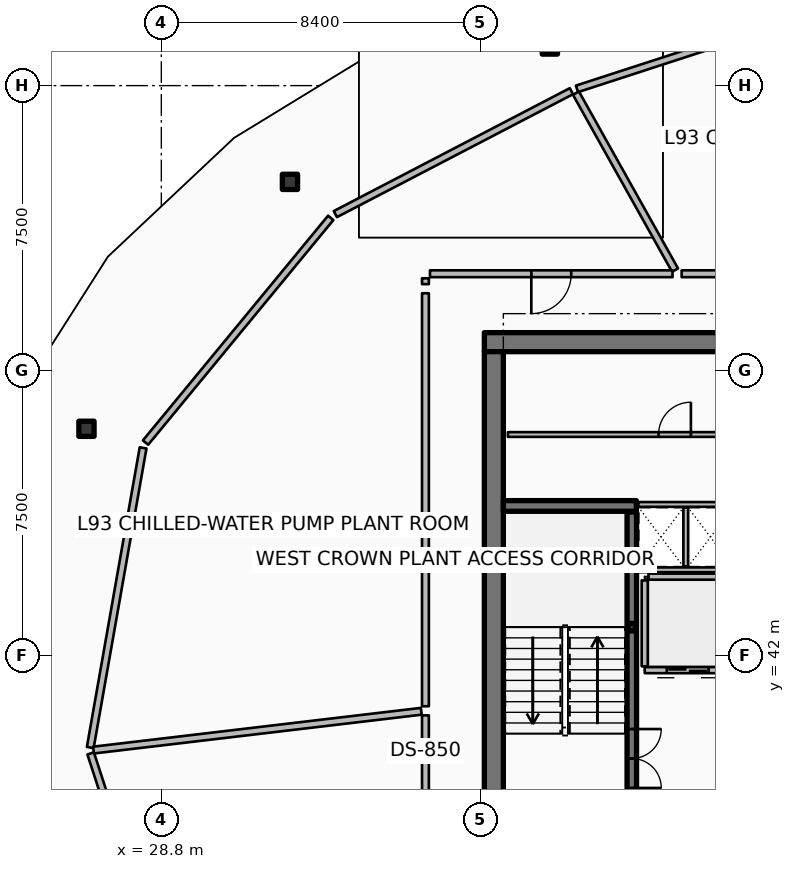
"""IFC4 building model, lengths in metres.
Left out: names, types, materials, properties, quantities, classifications, styles, units other than length and angle.
Written with IfcOpenShell. Run it as: python <this file> out.ifc"""

import sys

from ifc_helpers import new_model, si_unit, direction, frame, frame_2d, origin, origin_2d, place, context, subcontext, project, spatial, rectangle, hollow_rectangle, extrude, element, fill, save


model = new_model("IFC4")
c1 = context("Model", 3, precision=1e-05, world=origin(), true_north=direction((0.0, 1.0)))
c2 = subcontext(c1, "Body", "Model", "MODEL_VIEW")
j1 = project(units=[si_unit("LENGTHUNIT", "METRE"), si_unit("PLANEANGLEUNIT", "RADIAN")], contexts=[c1])
p1 = place(None, origin())
s1 = spatial("IfcSite", under=j1, at=p1, CompositionType="ELEMENT")
p2 = place(p1, origin())
s2 = spatial("IfcBuilding", under=s1, at=p2, CompositionType="ELEMENT")
p3 = place(p2, frame((0.0, 0.0, 370.4)))
s3 = spatial("IfcBuildingStorey", under=s2, at=p3, CompositionType="ELEMENT", Elevation=370.4)
p4 = place(p3, frame((37.3, 50.25, 0.0), z_axis=(0.0, 0.0, 1.0), x_axis=(1.0, 0.0, 0.0)))
e1 = element("IfcWall", 1, at=p4, inside=s3, PredefinedType="SHEAR", context=c2, shape_type="SweptSolid", body=[
    extrude(rectangle(XDim=9.6, YDim=0.5, at=frame_2d((4.8, 0.0))), origin(), (0.0, 0.0, 1.0), 3.6),
])
p5 = place(p3, frame((37.55, 34.0, 0.0), z_axis=(0.0, 0.0, 1.0), x_axis=(0.0, 1.0, 0.0)))
e2 = element("IfcWall", 2, at=p5, inside=s3, PredefinedType="SHEAR", context=c2, shape_type="SweptSolid", body=[
    extrude(rectangle(XDim=16.0, YDim=0.5, at=frame_2d((8.0, 0.0))), origin(), (0.0, 0.0, 1.0), 3.6),
])
p6 = place(p3, frame((37.8, 45.94, 0.0), z_axis=(0.0, 0.0, 1.0), x_axis=(1.0, 0.0, 0.0)))
e3 = element("IfcWall", 3, at=p6, inside=s3, PredefinedType="SHEAR", context=c2, shape_type="SweptSolid", body=[
    extrude(rectangle(XDim=3.5, YDim=0.28, at=frame_2d((1.75, 0.0))), origin(), (0.0, 0.0, 1.0), 3.6),
])
p7 = place(p3, frame((41.18, 42.75, 0.0), z_axis=(0.0, 0.0, 1.0), x_axis=(1.0, 0.0, 0.0)))
e4 = element("IfcColumn", 4, at=p7, inside=s3, PredefinedType="COLUMN", context=c2, shape_type="SweptSolid", body=[
    extrude(hollow_rectangle(XDim=0.2, YDim=0.2, WallThickness=0.01, InnerFilletRadius=0.01, OuterFilletRadius=0.02, at=origin_2d()), origin(), (0.0, 0.0, 1.0), 1.595),
])
for number, where, z_axis, x_axis in (
    (5, (39.023, 58.029, 0.0), (0.0, 0.0, 1.0), (1.0, 0.0, 0.0)),
    (6, (32.185, 54.468, 0.0), (0.0, 0.0, 1.0), (1.0, 0.0, 0.0)),
    (7, (26.83, 47.97, 0.0), (0.0, 0.0, 1.0), (1.0, 0.0, 0.0)),
):
    element("IfcColumn", number, at=place(p3, frame(where, z_axis=z_axis, x_axis=x_axis)), inside=s3, PredefinedType="COLUMN", context=c2, shape_type="SweptSolid", body=[
        extrude(hollow_rectangle(XDim=0.4, YDim=0.4, WallThickness=0.02, InnerFilletRadius=0.02, OuterFilletRadius=0.04, at=origin_2d()), origin(), (0.0, 0.0, 1.0), 3.32),
    ])
p8 = place(p3, frame((41.18, 38.22, 0.0), z_axis=(0.0, 0.0, 1.0), x_axis=(0.0, 1.0, 0.0)))
e8 = element("IfcWall", 8, at=p8, inside=s3, PredefinedType="SOLIDWALL", context=c2, shape_type="SweptSolid", body=[
    extrude(rectangle(XDim=7.56, YDim=0.25, at=frame_2d((3.78, 0.0))), origin(), (0.0, 0.0, 1.0), 3.32),
])
p9 = place(p8, frame((0.3, 0.0, 0.0)))
e9 = element("IfcOpeningElement", 9, at=p9, cuts=e8, PredefinedType="OPENING", context=c2, shape_type="SweptSolid", body=[
    extrude(rectangle(XDim=1.55, YDim=2.15, at=frame_2d((0.775, 1.075))), frame((0.0, 0.135, 0.0), z_axis=(0.0, -1.0, 0.0), x_axis=(1.0, 0.0, 0.0)), (0.0, 0.0, 1.0), 0.27),
])
p10 = place(p3, frame((43.78, 41.62, 0.0), z_axis=(0.0, 0.0, 1.0), x_axis=(-1.0, 0.0, 0.0)))
e10 = element("IfcWall", 10, at=p10, inside=s3, PredefinedType="PARTITIONING", context=c2, shape_type="SweptSolid", body=[
    extrude(rectangle(XDim=2.26, YDim=0.16, at=frame_2d((1.13, 0.0))), origin(), (0.0, 0.0, 1.0), 3.32),
])
p11 = place(p10, frame((0.58, 0.0, 0.0)))
e11 = element("IfcOpeningElement", 11, at=p11, cuts=e10, PredefinedType="OPENING", context=c2, shape_type="SweptSolid", body=[
    extrude(rectangle(XDim=1.1, YDim=2.1, at=frame_2d((0.55, 1.05))), frame((0.0, 0.09, 0.0), z_axis=(0.0, -1.0, 0.0), x_axis=(1.0, 0.0, 0.0)), (0.0, 0.0, 1.0), 0.18),
])
p12 = place(p3, frame((41.52, 41.72, 0.0), z_axis=(0.0, 0.0, 1.0), x_axis=(0.0, 1.0, 0.0)))
e12 = element("IfcWall", 12, at=p12, inside=s3, PredefinedType="PARTITIONING", context=c2, shape_type="SweptSolid", body=[
    extrude(rectangle(XDim=2.26, YDim=0.16, at=frame_2d((1.13, 0.0))), origin(), (0.0, 0.0, 1.0), 3.32),
])
p13 = place(p3, frame((41.62, 44.08, 0.0), z_axis=(0.0, 0.0, 1.0), x_axis=(1.0, 0.0, 0.0)))
e13 = element("IfcWall", 13, at=p13, inside=s3, PredefinedType="PARTITIONING", context=c2, shape_type="SweptSolid", body=[
    extrude(rectangle(XDim=2.06, YDim=0.16, at=frame_2d((1.03, 0.0))), origin(), (0.0, 0.0, 1.0), 3.32),
])
p14 = place(p3, frame((37.92, 47.82, 0.0), z_axis=(0.0, 0.0, 1.0), x_axis=(1.0, 0.0, 0.0)))
e14 = element("IfcWall", 14, at=p14, inside=s3, PredefinedType="PARTITIONING", context=c2, shape_type="SweptSolid", body=[
    extrude(rectangle(XDim=8.78, YDim=0.125, at=frame_2d((4.39, 0.0))), origin(), (0.0, 0.0, 1.0), 2.76),
])
p15 = place(p14, frame((3.965, 0.0, 0.0)))
e15 = element("IfcOpeningElement", 15, at=p15, cuts=e14, PredefinedType="OPENING", context=c2, shape_type="SweptSolid", body=[
    extrude(rectangle(XDim=0.85, YDim=2.06, at=frame_2d((0.425, 1.03))), frame((0.0, 0.073, 0.0), z_axis=(0.0, -1.0, 0.0), x_axis=(1.0, 0.0, 0.0)), (0.0, 0.0, 1.0), 0.145),
])
p16 = place(p3, frame((41.36, 44.26, 0.0), z_axis=(0.0, 0.0, 1.0), x_axis=(1.0, 0.0, 0.0)))
e16 = element("IfcWall", 16, at=p16, inside=s3, PredefinedType="PARTITIONING", context=c2, shape_type="SweptSolid", body=[
    extrude(rectangle(XDim=2.5, YDim=0.125, at=frame_2d((1.25, 0.0))), origin(), (0.0, 0.0, 1.0), 2.76),
])
p17 = place(p3, frame((42.6, 44.35, 0.0), z_axis=(0.0, 0.0, 1.0), x_axis=(0.0, 1.0, 0.0)))
e17 = element("IfcWall", 17, at=p17, inside=s3, PredefinedType="PARTITIONING", context=c2, shape_type="SweptSolid", body=[
    extrude(rectangle(XDim=1.55, YDim=0.125, at=frame_2d((0.775, 0.0))), origin(), (0.0, 0.0, 1.0), 2.76),
])
p18 = place(p3, frame((41.35, 45.98, 0.0), z_axis=(0.0, 0.0, 1.0), x_axis=(1.0, 0.0, 0.0)))
e18 = element("IfcWall", 18, at=p18, inside=s3, PredefinedType="PARTITIONING", context=c2, shape_type="SweptSolid", body=[
    extrude(rectangle(XDim=2.53, YDim=0.125, at=frame_2d((1.265, 0.0))), origin(), (0.0, 0.0, 1.0), 2.76),
])
p19 = place(p3, frame((45.918, 58.923, 0.0), z_axis=(0.0, 0.0, 1.0), x_axis=(-0.95105283999, -0.309028308649, 0.0)))
e19 = element("IfcWall", 19, at=p19, inside=s3, PredefinedType="PARTITIONING", context=c2, shape_type="SweptSolid", body=[
    extrude(rectangle(XDim=6.499, YDim=0.18, at=frame_2d((3.25, 0.0))), origin(), (0.0, 0.0, 1.0), 2.76),
])
p20 = place(p3, frame((39.59, 56.853, 0.0), z_axis=(0.0, 0.0, 1.0), x_axis=(-0.886949494865, -0.461866423935, 0.0)))
e20 = element("IfcWall", 20, at=p20, inside=s3, PredefinedType="PARTITIONING", context=c2, shape_type="SweptSolid", body=[
    extrude(rectangle(XDim=7.002, YDim=0.18, at=frame_2d((3.501, 0.0))), origin(), (0.0, 0.0, 1.0), 2.76),
])
p21 = place(p3, frame((33.258, 53.52, 0.0), z_axis=(0.0, 0.0, 1.0), x_axis=(-0.636018833443, -0.771673534278, 0.0)))
e21 = element("IfcWall", 21, at=p21, inside=s3, PredefinedType="PARTITIONING", context=c2, shape_type="SweptSolid", body=[
    extrude(rectangle(XDim=7.661, YDim=0.18, at=frame_2d((3.831, 0.0))), origin(), (0.0, 0.0, 1.0), 2.76),
])
p22 = place(p3, frame((28.32, 47.468, 0.0), z_axis=(0.0, 0.0, 1.0), x_axis=(-0.173668776466, -0.984804120666, 0.0)))
e22 = element("IfcWall", 22, at=p22, inside=s3, PredefinedType="PARTITIONING", context=c2, shape_type="SweptSolid", body=[
    extrude(rectangle(XDim=8.006, YDim=0.18, at=frame_2d((4.003, 0.0))), origin(), (0.0, 0.0, 1.0), 2.76),
])
p23 = place(p3, frame((26.941, 39.428, 0.0), z_axis=(0.0, 0.0, 1.0), x_axis=(0.309024234991, -0.951054163646, 0.0)))
e23 = element("IfcWall", 23, at=p23, inside=s3, PredefinedType="PARTITIONING", context=c2, shape_type="SweptSolid", body=[
    extrude(rectangle(XDim=8.124, YDim=0.18, at=frame_2d((4.062, 0.0))), origin(), (0.0, 0.0, 1.0), 2.76),
])
p24 = place(p3, frame((46.69, 52.05, 0.0), z_axis=(0.0, 0.0, 1.0), x_axis=(-1.0, 0.0, 0.0)))
e24 = element("IfcWall", 24, at=p24, inside=s3, PredefinedType="PARTITIONING", context=c2, shape_type="SweptSolid", body=[
    extrude(rectangle(XDim=4.199, YDim=0.18, at=frame_2d((2.099, 0.0))), origin(), (0.0, 0.0, 1.0), 2.76),
])
p25 = place(p24, frame((1.574, 0.0, 0.0)))
e25 = element("IfcOpeningElement", 25, at=p25, cuts=e24, PredefinedType="OPENING", context=c2, shape_type="SweptSolid", body=[
    extrude(rectangle(XDim=1.05, YDim=2.1, at=frame_2d((0.525, 1.05))), frame((0.0, 0.1, 0.0), z_axis=(0.0, -1.0, 0.0), x_axis=(1.0, 0.0, 0.0)), (0.0, 0.0, 1.0), 0.2),
])
p26 = place(p3, frame((42.318, 52.146, 0.0), z_axis=(0.0, 0.0, 1.0), x_axis=(-0.488622869326, 0.872495095443, 0.0)))
e26 = element("IfcWall", 26, at=p26, inside=s3, PredefinedType="PARTITIONING", context=c2, shape_type="SweptSolid", body=[
    extrude(rectangle(XDim=5.337, YDim=0.18, at=frame_2d((2.668, 0.0))), origin(), (0.0, 0.0, 1.0), 2.76),
])
p27 = place(p3, frame((42.252, 52.05, 0.0), z_axis=(0.0, 0.0, 1.0), x_axis=(-1.0, 0.0, 0.0)))
e27 = element("IfcWall", 27, at=p27, inside=s3, PredefinedType="PARTITIONING", context=c2, shape_type="SweptSolid", body=[
    extrude(rectangle(XDim=6.382, YDim=0.18, at=frame_2d((3.191, 0.0))), origin(), (0.0, 0.0, 1.0), 2.76),
])
p28 = place(p27, frame((2.666, 0.0, 0.0)))
e28 = element("IfcOpeningElement", 28, at=p28, cuts=e27, PredefinedType="OPENING", context=c2, shape_type="SweptSolid", body=[
    extrude(rectangle(XDim=1.05, YDim=2.1, at=frame_2d((0.525, 1.05))), frame((0.0, 0.1, 0.0), z_axis=(0.0, -1.0, 0.0), x_axis=(1.0, 0.0, 0.0)), (0.0, 0.0, 1.0), 0.2),
])
p29 = place(p3, frame((35.75, 51.93, 0.0), z_axis=(0.0, 0.0, 1.0), x_axis=(0.0, -1.0, 0.0)))
e29 = element("IfcWall", 29, at=p29, inside=s3, PredefinedType="PARTITIONING", context=c2, shape_type="SweptSolid", body=[
    extrude(rectangle(XDim=0.153, YDim=0.18, at=frame_2d((0.076, 0.0))), origin(), (0.0, 0.0, 1.0), 2.76),
])
p30 = place(p3, frame((35.75, 51.537, 0.0), z_axis=(0.0, 0.0, 1.0), x_axis=(0.0, -1.0, 0.0)))
e30 = element("IfcWall", 30, at=p30, inside=s3, PredefinedType="PARTITIONING", context=c2, shape_type="SweptSolid", body=[
    extrude(rectangle(XDim=5.962, YDim=0.18, at=frame_2d((2.981, 0.0))), origin(), (0.0, 0.0, 1.0), 2.76),
])
p31 = place(p3, frame((35.75, 45.335, 0.0), z_axis=(0.0, 0.0, 1.0), x_axis=(0.0, -1.0, 0.0)))
e31 = element("IfcWall", 31, at=p31, inside=s3, PredefinedType="PARTITIONING", context=c2, shape_type="SweptSolid", body=[
    extrude(rectangle(XDim=4.665, YDim=0.18, at=frame_2d((2.333, 0.0))), origin(), (0.0, 0.0, 1.0), 2.76),
])
p32 = place(p3, frame((35.641, 40.537, 0.0), z_axis=(0.0, 0.0, 1.0), x_axis=(-0.993070751419, -0.117518010011, 0.0)))
e32 = element("IfcWall", 32, at=p32, inside=s3, PredefinedType="PARTITIONING", context=c2, shape_type="SweptSolid", body=[
    extrude(rectangle(XDim=8.686, YDim=0.18, at=frame_2d((4.343, 0.0))), origin(), (0.0, 0.0, 1.0), 2.76),
])
p33 = place(p3, frame((35.75, 40.43, 0.0), z_axis=(0.0, 0.0, 1.0), x_axis=(0.0, -1.0, 0.0)))
e33 = element("IfcWall", 33, at=p33, inside=s3, PredefinedType="PARTITIONING", context=c2, shape_type="SweptSolid", body=[
    extrude(rectangle(XDim=5.17, YDim=0.18, at=frame_2d((2.585, 0.0))), origin(), (0.0, 0.0, 1.0), 2.76),
])
p34 = place(p33, frame((2.16, 0.0, 0.0)))
e34 = element("IfcOpeningElement", 34, at=p34, cuts=e33, PredefinedType="OPENING", context=c2, shape_type="SweptSolid", body=[
    extrude(rectangle(XDim=0.85, YDim=2.06, at=frame_2d((0.425, 1.03))), frame((0.0, 0.1, 0.0), z_axis=(0.0, -1.0, 0.0), x_axis=(1.0, 0.0, 0.0)), (0.0, 0.0, 1.0), 0.2),
])
p35 = place(p9, origin())
e35 = element("IfcDoor", 35, at=p35, inside=s3, OperationType="DOUBLE_DOOR_SINGLE_SWING", PredefinedType="DOOR", context=c2, shape_type="SweptSolid", body=[
    extrude(rectangle(XDim=1.55, YDim=2.15, at=frame_2d((0.775, 1.075))), frame((0.0, 0.025, 0.0), z_axis=(0.0, -1.0, 0.0), x_axis=(1.0, 0.0, 0.0)), (0.0, 0.0, 1.0), 0.05),
])
fill(e9, e35)
p36 = place(p11, origin())
e36 = element("IfcDoor", 36, at=p36, inside=s3, OperationType="DOUBLE_DOOR_SLIDING", PredefinedType="DOOR", context=c2, shape_type="SweptSolid", body=[
    extrude(rectangle(XDim=1.1, YDim=2.1, at=frame_2d((0.55, 1.05))), frame((0.0, 0.025, 0.0), z_axis=(0.0, -1.0, 0.0), x_axis=(1.0, 0.0, 0.0)), (0.0, 0.0, 1.0), 0.05),
])
fill(e11, e36)
p37 = place(p15, origin())
e37 = element("IfcDoor", 37, at=p37, inside=s3, OperationType="SINGLE_SWING_RIGHT", PredefinedType="DOOR", context=c2, shape_type="SweptSolid", body=[
    extrude(rectangle(XDim=0.85, YDim=2.06, at=frame_2d((0.425, 1.03))), frame((0.0, 0.025, 0.0), z_axis=(0.0, -1.0, 0.0), x_axis=(1.0, 0.0, 0.0)), (0.0, 0.0, 1.0), 0.05),
])
fill(e15, e37)
p38 = place(p28, origin())
e38 = element("IfcDoor", 38, at=p38, inside=s3, OperationType="SINGLE_SWING_RIGHT", PredefinedType="DOOR", context=c2, shape_type="SweptSolid", body=[
    extrude(rectangle(XDim=1.05, YDim=2.1, at=frame_2d((0.525, 1.05))), frame((0.0, 0.025, 0.0), z_axis=(0.0, -1.0, 0.0), x_axis=(1.0, 0.0, 0.0)), (0.0, 0.0, 1.0), 0.05),
])
fill(e28, e38)
save(model, sys.argv[1])
